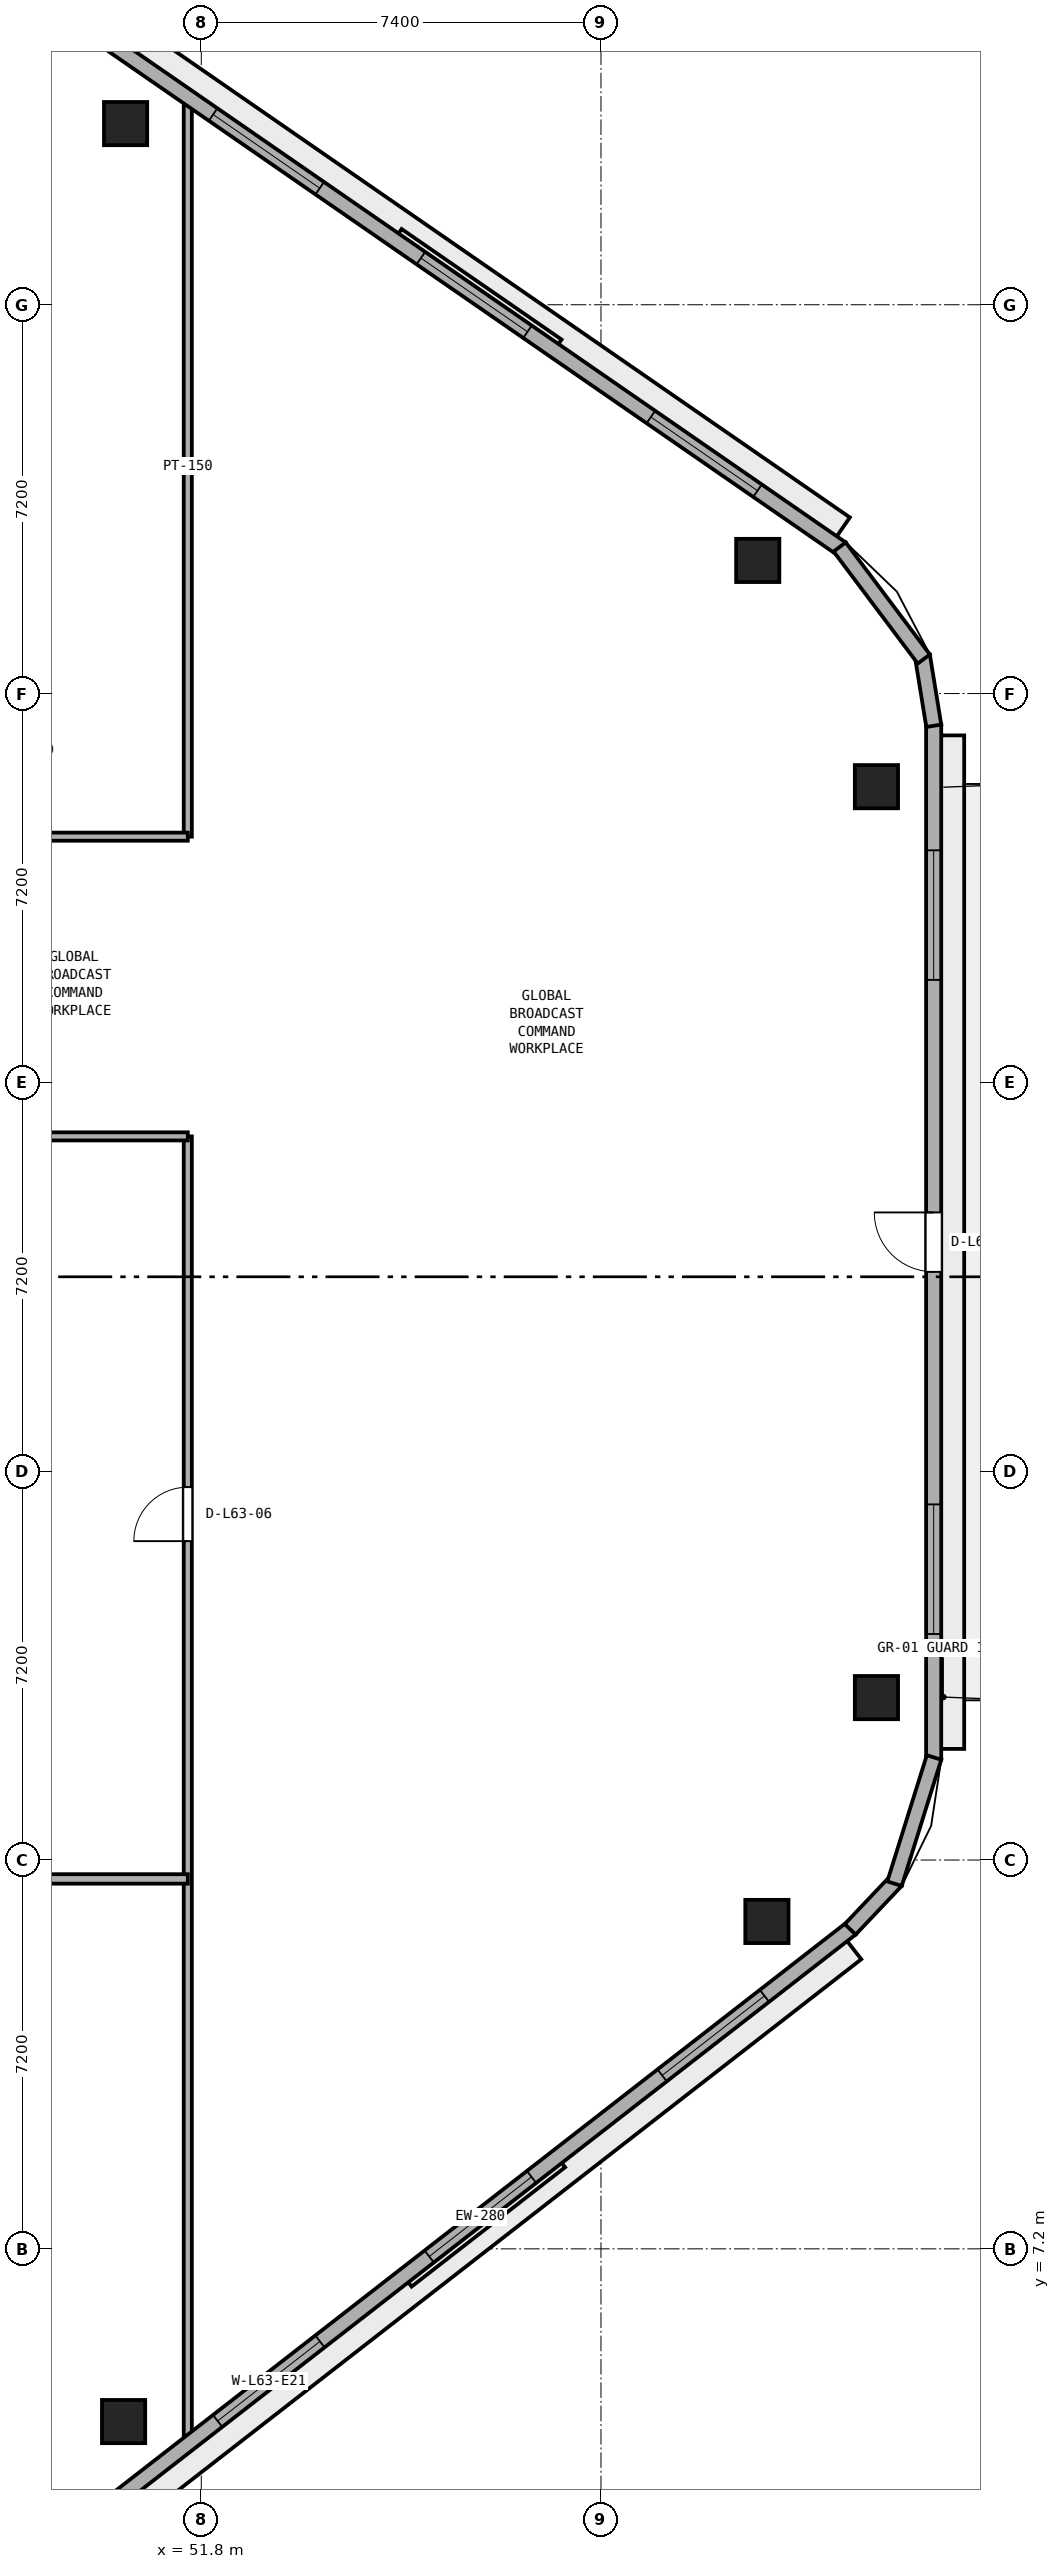
"""IFC4 building model, lengths in metres.
Left out: names, types, materials, properties, quantities, classifications, styles, units other than length and angle.
Written with IfcOpenShell. Run it as: python <this file> out.ifc"""

import sys

from ifc_helpers import new_model, si_unit, direction, frame, frame_2d, origin, origin_2d, place, context, subcontext, project, spatial, rectangle, extrude, element, fill, save


model = new_model("IFC4")
c1 = context("Model", 3, precision=1e-05, world=origin(), true_north=direction((0.0, 1.0)))
c2 = subcontext(c1, "Body", "Model", "MODEL_VIEW")
j1 = project(units=[si_unit("LENGTHUNIT", "METRE"), si_unit("PLANEANGLEUNIT", "RADIAN")], contexts=[c1])
p1 = place(None, origin())
s1 = spatial("IfcSite", under=j1, at=p1, CompositionType="ELEMENT")
p2 = place(p1, origin())
s2 = spatial("IfcBuilding", under=s1, at=p2, CompositionType="ELEMENT")
p3 = place(p2, frame((0.0, 0.0, 247.8)))
s3 = spatial("IfcBuildingStorey", under=s2, at=p3, CompositionType="ELEMENT", Elevation=247.8)
for number, where, z_axis, x_axis in (
    (1, (50.361, 4.002, 0.0), (0.0, 0.0, 1.0), (1.0, 0.0, 0.0)),
    (2, (62.272, 13.262, 0.0), (0.0, 0.0, 1.0), (1.0, 0.0, 0.0)),
    (3, (64.3, 17.408, 0.0), (0.0, 0.0, 1.0), (1.0, 0.0, 0.0)),
    (4, (64.3, 34.276, 0.0), (0.0, 0.0, 1.0), (1.0, 0.0, 0.0)),
    (5, (62.103, 38.465, 0.0), (0.0, 0.0, 1.0), (1.0, 0.0, 0.0)),
    (6, (50.398, 46.554, 0.0), (0.0, 0.0, 1.0), (1.0, 0.0, 0.0)),
):
    element("IfcColumn", number, at=place(p3, frame(where, z_axis=z_axis, x_axis=x_axis)), inside=s3, PredefinedType="COLUMN", context=c2, shape_type="SweptSolid", body=[
        extrude(rectangle(XDim=0.8, YDim=0.8, at=origin_2d()), origin(), (0.0, 0.0, 1.0), 3.8),
    ])
p4 = place(p3, frame((51.55, 3.546, 0.0), z_axis=(0.0, 0.0, 1.0), x_axis=(0.0, 1.0, 0.0)))
e7 = element("IfcWall", 7, at=p4, inside=s3, PredefinedType="PARTITIONING", context=c2, shape_type="SweptSolid", body=[
    extrude(rectangle(XDim=24.254, YDim=0.15, at=frame_2d((12.127, 0.0))), origin(), (0.0, 0.0, 1.0), 3.51),
])
p5 = place(p4, frame((16.759, 0.0, 0.0)))
e8 = element("IfcOpeningElement", 8, at=p5, cuts=e7, PredefinedType="OPENING", context=c2, shape_type="SweptSolid", body=[
    extrude(rectangle(XDim=1.0, YDim=2.12, at=frame_2d((0.5, 1.06))), frame((0.0, 0.085, 0.0), z_axis=(0.0, -1.0, 0.0), x_axis=(1.0, 0.0, 0.0)), (0.0, 0.0, 1.0), 0.17),
])
p6 = place(p3, frame((51.55, 33.35, 0.0), z_axis=(0.0, 0.0, 1.0), x_axis=(0.0, 1.0, 0.0)))
e9 = element("IfcWall", 9, at=p6, inside=s3, PredefinedType="PARTITIONING", context=c2, shape_type="SweptSolid", body=[
    extrude(rectangle(XDim=13.727, YDim=0.15, at=frame_2d((6.863, 0.0))), origin(), (0.0, 0.0, 1.0), 3.51),
])
p7 = place(p3, frame((38.35, 14.05, 0.0), z_axis=(0.0, 0.0, 1.0), x_axis=(1.0, 0.0, 0.0)))
e10 = element("IfcWall", 10, at=p7, inside=s3, PredefinedType="PARTITIONING", context=c2, shape_type="SweptSolid", body=[
    extrude(rectangle(XDim=13.2, YDim=0.175, at=frame_2d((6.6, 0.0))), origin(), (0.0, 0.0, 1.0), 3.51),
])
p8 = place(p7, frame((6.15, 0.0, 0.0)))
e11 = element("IfcOpeningElement", 11, at=p8, cuts=e10, PredefinedType="OPENING", context=c2, shape_type="SweptSolid", body=[
    extrude(rectangle(XDim=0.9, YDim=2.1, at=frame_2d((0.45, 1.05))), frame((0.0, 0.097, 0.0), z_axis=(0.0, -1.0, 0.0), x_axis=(1.0, 0.0, 0.0)), (0.0, 0.0, 1.0), 0.195),
])
p9 = place(p3, frame((48.74, 27.8, 0.0), z_axis=(0.0, 0.0, 1.0), x_axis=(1.0, 0.0, 0.0)))
e12 = element("IfcWall", 12, at=p9, inside=s3, PredefinedType="PARTITIONING", context=c2, shape_type="SweptSolid", body=[
    extrude(rectangle(XDim=2.81, YDim=0.15, at=frame_2d((1.405, 0.0))), origin(), (0.0, 0.0, 1.0), 3.51),
])
p10 = place(p3, frame((48.74, 33.35, 0.0), z_axis=(0.0, 0.0, 1.0), x_axis=(1.0, 0.0, 0.0)))
e13 = element("IfcWall", 13, at=p10, inside=s3, PredefinedType="PARTITIONING", context=c2, shape_type="SweptSolid", body=[
    extrude(rectangle(XDim=2.81, YDim=0.15, at=frame_2d((1.405, 0.0))), origin(), (0.0, 0.0, 1.0), 2.893),
])
p11 = place(p3, frame((50.104, 2.459, 0.0), z_axis=(0.0, 0.0, 1.0), x_axis=(0.789464857485, 0.613795763097, 0.0)))
e14 = element("IfcWall", 14, at=p11, inside=s3, PredefinedType="STANDARD", context=c2, shape_type="SweptSolid", body=[
    extrude(rectangle(XDim=17.387, YDim=0.28, at=frame_2d((8.694, 0.0))), origin(), (0.0, 0.0, 1.0), 3.51),
])
p12 = place(p11, frame((2.531, 0.0, 0.9)))
e15 = element("IfcOpeningElement", 15, at=p12, cuts=e14, PredefinedType="OPENING", context=c2, shape_type="SweptSolid", body=[
    extrude(rectangle(XDim=2.4, YDim=1.75, at=frame_2d((1.2, 0.875))), frame((0.0, 0.15, 0.0), z_axis=(0.0, -1.0, 0.0), x_axis=(1.0, 0.0, 0.0)), (0.0, 0.0, 1.0), 0.3),
])
p13 = place(p11, frame((7.494, 0.0, 0.9)))
e16 = element("IfcOpeningElement", 16, at=p13, cuts=e14, PredefinedType="OPENING", context=c2, shape_type="SweptSolid", body=[
    extrude(rectangle(XDim=2.4, YDim=1.75, at=frame_2d((1.2, 0.875))), frame((0.0, 0.15, 0.0), z_axis=(0.0, -1.0, 0.0), x_axis=(1.0, 0.0, 0.0)), (0.0, 0.0, 1.0), 0.3),
])
p14 = place(p11, frame((12.956, 0.0, 0.9)))
e17 = element("IfcOpeningElement", 17, at=p14, cuts=e14, PredefinedType="OPENING", context=c2, shape_type="SweptSolid", body=[
    extrude(rectangle(XDim=2.4, YDim=1.75, at=frame_2d((1.2, 0.875))), frame((0.0, 0.15, 0.0), z_axis=(0.0, -1.0, 0.0), x_axis=(1.0, 0.0, 0.0)), (0.0, 0.0, 1.0), 0.3),
])
p15 = place(p3, frame((65.36, 16.258, 0.0), z_axis=(0.0, 0.0, 1.0), x_axis=(0.0, 1.0, 0.0)))
e18 = element("IfcWall", 18, at=p15, inside=s3, PredefinedType="STANDARD", context=c2, shape_type="SweptSolid", body=[
    extrude(rectangle(XDim=19.168, YDim=0.28, at=frame_2d((9.584, 0.0))), origin(), (0.0, 0.0, 1.0), 3.51),
])
p16 = place(p15, frame((9.034, 0.0, 0.0)))
e19 = element("IfcOpeningElement", 19, at=p16, cuts=e18, PredefinedType="OPENING", context=c2, shape_type="SweptSolid", body=[
    extrude(rectangle(XDim=1.1, YDim=2.2, at=frame_2d((0.55, 1.1))), frame((0.0, 0.15, 0.0), z_axis=(0.0, -1.0, 0.0), x_axis=(1.0, 0.0, 0.0)), (0.0, 0.0, 1.0), 0.3),
])
p17 = place(p15, frame((2.328, 0.0, 0.9)))
e20 = element("IfcOpeningElement", 20, at=p17, cuts=e18, PredefinedType="OPENING", context=c2, shape_type="SweptSolid", body=[
    extrude(rectangle(XDim=2.4, YDim=1.75, at=frame_2d((1.2, 0.875))), frame((0.0, 0.15, 0.0), z_axis=(0.0, -1.0, 0.0), x_axis=(1.0, 0.0, 0.0)), (0.0, 0.0, 1.0), 0.3),
])
p18 = place(p15, frame((14.44, 0.0, 0.9)))
e21 = element("IfcOpeningElement", 21, at=p18, cuts=e18, PredefinedType="OPENING", context=c2, shape_type="SweptSolid", body=[
    extrude(rectangle(XDim=2.4, YDim=1.75, at=frame_2d((1.2, 0.875))), frame((0.0, 0.15, 0.0), z_axis=(0.0, -1.0, 0.0), x_axis=(1.0, 0.0, 0.0)), (0.0, 0.0, 1.0), 0.3),
])
p19 = place(p3, frame((63.651, 38.683, 0.0), z_axis=(0.0, 0.0, 1.0), x_axis=(-0.822655095, 0.568540759022, 0.0)))
e22 = element("IfcWall", 22, at=p19, inside=s3, PredefinedType="STANDARD", context=c2, shape_type="SweptSolid", body=[
    extrude(rectangle(XDim=16.528, YDim=0.28, at=frame_2d((8.264, 0.0))), origin(), (0.0, 0.0, 1.0), 3.51),
])
p20 = place(p19, frame((1.888, 0.0, 0.9)))
e23 = element("IfcOpeningElement", 23, at=p20, cuts=e22, PredefinedType="OPENING", context=c2, shape_type="SweptSolid", body=[
    extrude(rectangle(XDim=2.4, YDim=1.75, at=frame_2d((1.2, 0.875))), frame((0.0, 0.15, 0.0), z_axis=(0.0, -1.0, 0.0), x_axis=(1.0, 0.0, 0.0)), (0.0, 0.0, 1.0), 0.3),
])
p21 = place(p19, frame((7.064, 0.0, 0.9)))
e24 = element("IfcOpeningElement", 24, at=p21, cuts=e22, PredefinedType="OPENING", context=c2, shape_type="SweptSolid", body=[
    extrude(rectangle(XDim=2.4, YDim=1.75, at=frame_2d((1.2, 0.875))), frame((0.0, 0.15, 0.0), z_axis=(0.0, -1.0, 0.0), x_axis=(1.0, 0.0, 0.0)), (0.0, 0.0, 1.0), 0.3),
])
p22 = place(p19, frame((11.74, 0.0, 0.9)))
e25 = element("IfcOpeningElement", 25, at=p22, cuts=e22, PredefinedType="OPENING", context=c2, shape_type="SweptSolid", body=[
    extrude(rectangle(XDim=2.4, YDim=1.75, at=frame_2d((1.2, 0.875))), frame((0.0, 0.15, 0.0), z_axis=(0.0, -1.0, 0.0), x_axis=(1.0, 0.0, 0.0)), (0.0, 0.0, 1.0), 0.3),
])
p23 = place(p3, frame((63.815, 13.117, 0.0), z_axis=(0.0, 0.0, 1.0), x_axis=(0.687733716128, 0.725963040176, 0.0)))
e26 = element("IfcWall", 26, at=p23, inside=s3, PredefinedType="STANDARD", context=c2, shape_type="SweptSolid", body=[
    extrude(rectangle(XDim=1.239, YDim=0.28, at=frame_2d((0.62, 0.0))), origin(), (0.0, 0.0, 1.0), 3.51),
])
p24 = place(p3, frame((64.635, 13.962, 0.0), z_axis=(0.0, 0.0, 1.0), x_axis=(0.298649578722, 0.954362839348, 0.0)))
e27 = element("IfcWall", 27, at=p24, inside=s3, PredefinedType="STANDARD", context=c2, shape_type="SweptSolid", body=[
    extrude(rectangle(XDim=2.449, YDim=0.28, at=frame_2d((1.225, 0.0))), origin(), (0.0, 0.0, 1.0), 3.51),
])
p25 = place(p3, frame((65.362, 35.403, 0.0), z_axis=(0.0, 0.0, 1.0), x_axis=(-0.160271674114, 0.987072940809, 0.0)))
e28 = element("IfcWall", 28, at=p25, inside=s3, PredefinedType="STANDARD", context=c2, shape_type="SweptSolid", body=[
    extrude(rectangle(XDim=1.315, YDim=0.28, at=frame_2d((0.657, 0.0))), origin(), (0.0, 0.0, 1.0), 3.51),
])
p26 = place(p3, frame((65.177, 36.639, 0.0), z_axis=(0.0, 0.0, 1.0), x_axis=(-0.600436386467, 0.799672524104, 0.0)))
e29 = element("IfcWall", 29, at=p26, inside=s3, PredefinedType="STANDARD", context=c2, shape_type="SweptSolid", body=[
    extrude(rectangle(XDim=2.595, YDim=0.28, at=frame_2d((1.298, 0.0))), origin(), (0.0, 0.0, 1.0), 3.51),
])
p27 = place(p5, origin())
e30 = element("IfcDoor", 30, at=p27, inside=s3, OperationType="SINGLE_SWING_LEFT", PredefinedType="DOOR", context=c2, shape_type="SweptSolid", body=[
    extrude(rectangle(XDim=1.0, YDim=2.12, at=frame_2d((0.5, 1.06))), frame((0.0, 0.025, 0.0), z_axis=(0.0, -1.0, 0.0), x_axis=(1.0, 0.0, 0.0)), (0.0, 0.0, 1.0), 0.05),
])
fill(e8, e30)
p28 = place(p12, origin())
e31 = element("IfcWindow", 31, at=p28, inside=s3, PartitioningType="SINGLE_PANEL", PredefinedType="WINDOW", context=c2, shape_type="SweptSolid", body=[
    extrude(rectangle(XDim=2.4, YDim=1.75, at=frame_2d((1.2, 0.875))), frame((0.0, 0.03, 0.0), z_axis=(0.0, -1.0, 0.0), x_axis=(1.0, 0.0, 0.0)), (0.0, 0.0, 1.0), 0.06),
])
fill(e15, e31)
p29 = place(p13, origin())
e32 = element("IfcWindow", 32, at=p29, inside=s3, PartitioningType="SINGLE_PANEL", PredefinedType="WINDOW", context=c2, shape_type="SweptSolid", body=[
    extrude(rectangle(XDim=2.4, YDim=1.75, at=frame_2d((1.2, 0.875))), frame((0.0, 0.03, 0.0), z_axis=(0.0, -1.0, 0.0), x_axis=(1.0, 0.0, 0.0)), (0.0, 0.0, 1.0), 0.06),
])
fill(e16, e32)
p30 = place(p14, origin())
e33 = element("IfcWindow", 33, at=p30, inside=s3, PartitioningType="SINGLE_PANEL", PredefinedType="WINDOW", context=c2, shape_type="SweptSolid", body=[
    extrude(rectangle(XDim=2.4, YDim=1.75, at=frame_2d((1.2, 0.875))), frame((0.0, 0.03, 0.0), z_axis=(0.0, -1.0, 0.0), x_axis=(1.0, 0.0, 0.0)), (0.0, 0.0, 1.0), 0.06),
])
fill(e17, e33)
p31 = place(p16, origin())
e34 = element("IfcDoor", 34, at=p31, inside=s3, OperationType="SINGLE_SWING_RIGHT", PredefinedType="DOOR", context=c2, shape_type="SweptSolid", body=[
    extrude(rectangle(XDim=1.1, YDim=2.2, at=frame_2d((0.55, 1.1))), frame((0.0, 0.025, 0.0), z_axis=(0.0, -1.0, 0.0), x_axis=(1.0, 0.0, 0.0)), (0.0, 0.0, 1.0), 0.05),
])
fill(e19, e34)
p32 = place(p17, origin())
e35 = element("IfcWindow", 35, at=p32, inside=s3, PartitioningType="SINGLE_PANEL", PredefinedType="WINDOW", context=c2, shape_type="SweptSolid", body=[
    extrude(rectangle(XDim=2.4, YDim=1.75, at=frame_2d((1.2, 0.875))), frame((0.0, 0.03, 0.0), z_axis=(0.0, -1.0, 0.0), x_axis=(1.0, 0.0, 0.0)), (0.0, 0.0, 1.0), 0.06),
])
fill(e20, e35)
p33 = place(p18, origin())
e36 = element("IfcWindow", 36, at=p33, inside=s3, PartitioningType="SINGLE_PANEL", PredefinedType="WINDOW", context=c2, shape_type="SweptSolid", body=[
    extrude(rectangle(XDim=2.4, YDim=1.75, at=frame_2d((1.2, 0.875))), frame((0.0, 0.03, 0.0), z_axis=(0.0, -1.0, 0.0), x_axis=(1.0, 0.0, 0.0)), (0.0, 0.0, 1.0), 0.06),
])
fill(e21, e36)
p34 = place(p20, origin())
e37 = element("IfcWindow", 37, at=p34, inside=s3, PartitioningType="SINGLE_PANEL", PredefinedType="WINDOW", context=c2, shape_type="SweptSolid", body=[
    extrude(rectangle(XDim=2.4, YDim=1.75, at=frame_2d((1.2, 0.875))), frame((0.0, 0.03, 0.0), z_axis=(0.0, -1.0, 0.0), x_axis=(1.0, 0.0, 0.0)), (0.0, 0.0, 1.0), 0.06),
])
fill(e23, e37)
p35 = place(p21, origin())
e38 = element("IfcWindow", 38, at=p35, inside=s3, PartitioningType="SINGLE_PANEL", PredefinedType="WINDOW", context=c2, shape_type="SweptSolid", body=[
    extrude(rectangle(XDim=2.4, YDim=1.75, at=frame_2d((1.2, 0.875))), frame((0.0, 0.03, 0.0), z_axis=(0.0, -1.0, 0.0), x_axis=(1.0, 0.0, 0.0)), (0.0, 0.0, 1.0), 0.06),
])
fill(e24, e38)
p36 = place(p22, origin())
e39 = element("IfcWindow", 39, at=p36, inside=s3, PartitioningType="SINGLE_PANEL", PredefinedType="WINDOW", context=c2, shape_type="SweptSolid", body=[
    extrude(rectangle(XDim=2.4, YDim=1.75, at=frame_2d((1.2, 0.875))), frame((0.0, 0.03, 0.0), z_axis=(0.0, -1.0, 0.0), x_axis=(1.0, 0.0, 0.0)), (0.0, 0.0, 1.0), 0.06),
])
fill(e25, e39)
save(model, sys.argv[1])
